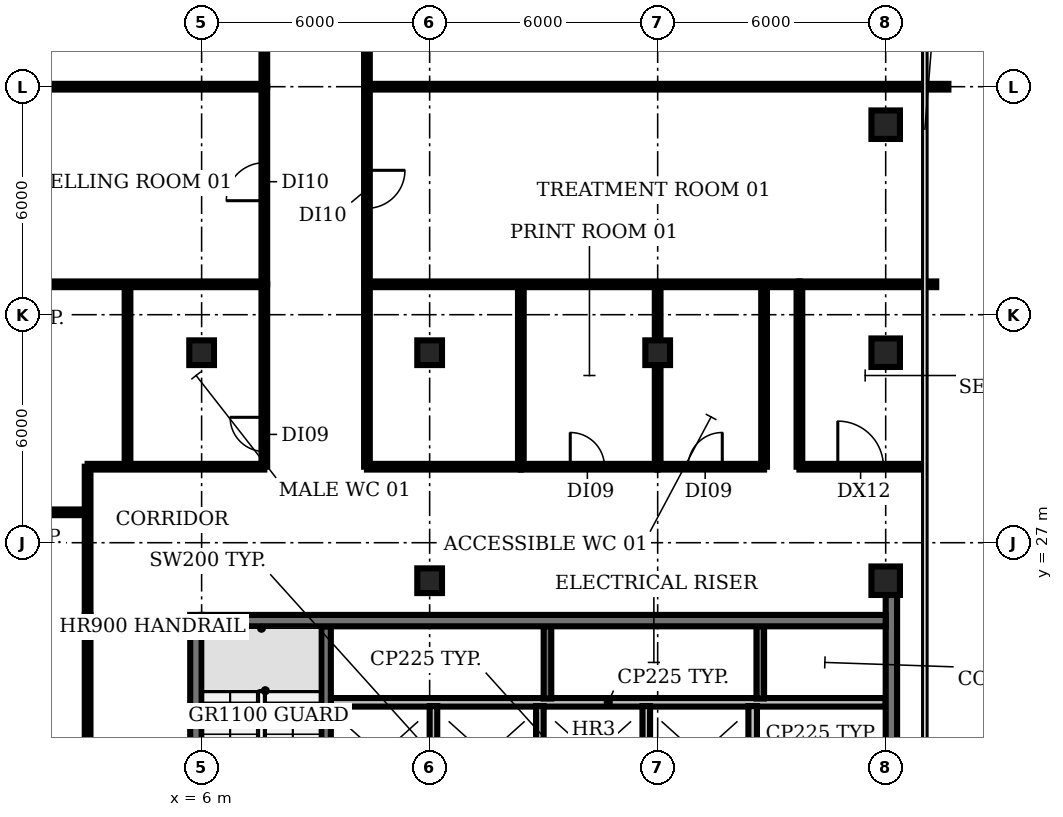
"""IFC4 building model, lengths in metres.
Left out: names, types, materials, properties, quantities, classifications, styles, units other than length and angle.
Written with IfcOpenShell. Run it as: python <this file> out.ifc"""

import sys

from ifc_helpers import new_model, si_unit, direction, frame, frame_2d, origin, origin_2d, place, context, subcontext, project, spatial, rectangle, extrude, element, fill, save


model = new_model("IFC4")
c1 = context("Model", 3, precision=1e-05, world=origin(), true_north=direction((0.0, 1.0)))
c2 = subcontext(c1, "Body", "Model", "MODEL_VIEW")
j1 = project(units=[si_unit("LENGTHUNIT", "METRE"), si_unit("PLANEANGLEUNIT", "RADIAN")], contexts=[c1])
p1 = place(None, origin())
s1 = spatial("IfcSite", under=j1, at=p1, CompositionType="ELEMENT")
p2 = place(p1, origin())
s2 = spatial("IfcBuilding", under=s1, at=p2, CompositionType="ELEMENT")
p3 = place(p2, frame((0.0, 0.0, 272.6)))
s3 = spatial("IfcBuildingStorey", under=s2, at=p3, CompositionType="ELEMENT", Elevation=272.6)
for number, where, z_axis, x_axis in (
    (1, (6.0, 32.0, 0.0), (0.0, 0.0, 1.0), (1.0, 0.0, 0.0)),
    (2, (12.0, 26.0, 0.0), (0.0, 0.0, 1.0), (1.0, 0.0, 0.0)),
    (3, (12.0, 32.0, 0.0), (0.0, 0.0, 1.0), (1.0, 0.0, 0.0)),
    (4, (18.0, 32.0, 0.0), (0.0, 0.0, 1.0), (1.0, 0.0, 0.0)),
):
    element("IfcColumn", number, at=place(p3, frame(where, z_axis=z_axis, x_axis=x_axis)), inside=s3, PredefinedType="COLUMN", context=c2, shape_type="SweptSolid", body=[
        extrude(rectangle(XDim=0.65, YDim=0.65, at=origin_2d()), origin(), (0.0, 0.0, 1.0), 3.85),
    ])
for number, where, z_axis, x_axis in (
    (5, (24.0, 26.0, 0.0), (0.0, 0.0, 1.0), (1.0, 0.0, 0.0)),
    (6, (24.0, 32.0, 0.0), (0.0, 0.0, 1.0), (1.0, 0.0, 0.0)),
    (7, (24.0, 38.0, 0.0), (0.0, 0.0, 1.0), (1.0, 0.0, 0.0)),
):
    element("IfcColumn", number, at=place(p3, frame(where, z_axis=z_axis, x_axis=x_axis)), inside=s3, PredefinedType="COLUMN", context=c2, shape_type="SweptSolid", body=[
        extrude(rectangle(XDim=0.75, YDim=0.75, at=origin_2d()), origin(), (0.0, 0.0, 1.0), 3.85),
    ])
p4 = place(p3, frame((9.4, 22.8, 0.0), z_axis=(0.0, 0.0, 1.0), x_axis=(1.0, 0.0, 0.0)))
e8 = element("IfcWall", 8, at=p4, inside=s3, PredefinedType="PARTITIONING", context=c2, shape_type="SweptSolid", body=[
    extrude(rectangle(XDim=14.6, YDim=0.225, at=frame_2d((7.3, 0.0))), origin(), (0.0, 0.0, 1.0), 3.85),
])
p5 = place(p3, frame((9.275, 18.375, 0.0), z_axis=(0.0, 0.0, 1.0), x_axis=(0.0, 1.0, 0.0)))
e9 = element("IfcWall", 9, at=p5, inside=s3, PredefinedType="SHEAR", context=c2, shape_type="SweptSolid", body=[
    extrude(rectangle(XDim=6.425, YDim=0.25, at=frame_2d((3.212, 0.0))), origin(), (0.0, 0.0, 1.0), 3.85),
])
for number, where, z_axis, x_axis in (
    (10, (12.1, 20.1, 0.0), (0.0, 0.0, 1.0), (0.0, 1.0, 0.0)),
    (11, (14.9, 20.1, 0.0), (0.0, 0.0, 1.0), (0.0, 1.0, 0.0)),
):
    element("IfcWall", number, at=place(p3, frame(where, z_axis=z_axis, x_axis=x_axis)), inside=s3, PredefinedType="SOLIDWALL", context=c2, shape_type="SweptSolid", body=[
        extrude(rectangle(XDim=2.6, YDim=0.2, at=frame_2d((1.3, 0.0))), origin(), (0.0, 0.0, 1.0), 3.85),
    ])
p6 = place(p3, frame((15.1, 22.9, 0.0), z_axis=(0.0, 0.0, 1.0), x_axis=(0.0, 1.0, 0.0)))
e12 = element("IfcWall", 12, at=p6, inside=s3, PredefinedType="SHEAR", context=c2, shape_type="SweptSolid", body=[
    extrude(rectangle(XDim=1.9, YDim=0.2, at=frame_2d((0.95, 0.0))), origin(), (0.0, 0.0, 1.0), 3.85),
])
p7 = place(p3, frame((17.7, 20.1, 0.0), z_axis=(0.0, 0.0, 1.0), x_axis=(0.0, 1.0, 0.0)))
e13 = element("IfcWall", 13, at=p7, inside=s3, PredefinedType="SOLIDWALL", context=c2, shape_type="SweptSolid", body=[
    extrude(rectangle(XDim=2.6, YDim=0.2, at=frame_2d((1.3, 0.0))), origin(), (0.0, 0.0, 1.0), 3.85),
])
p8 = place(p3, frame((20.5, 20.1, 0.0), z_axis=(0.0, 0.0, 1.0), x_axis=(0.0, 1.0, 0.0)))
e14 = element("IfcWall", 14, at=p8, inside=s3, PredefinedType="PARTITIONING", context=c2, shape_type="SweptSolid", body=[
    extrude(rectangle(XDim=2.6, YDim=0.225, at=frame_2d((1.3, 0.0))), origin(), (0.0, 0.0, 1.0), 3.85),
])
p9 = place(p3, frame((20.7, 22.9, 0.0), z_axis=(0.0, 0.0, 1.0), x_axis=(0.0, 1.0, 0.0)))
e15 = element("IfcWall", 15, at=p9, inside=s3, PredefinedType="SHEAR", context=c2, shape_type="SweptSolid", body=[
    extrude(rectangle(XDim=1.9, YDim=0.2, at=frame_2d((0.95, 0.0))), origin(), (0.0, 0.0, 1.0), 3.85),
])
p10 = place(p3, frame((5.85, 5.1, 0.0), z_axis=(0.0, 0.0, 1.0), x_axis=(0.0, 1.0, 0.0)))
e16 = element("IfcWall", 16, at=p10, inside=s3, PredefinedType="SHEAR", context=c2, shape_type="SweptSolid", body=[
    extrude(rectangle(XDim=20.0, YDim=0.3, at=frame_2d((10.0, 0.0))), origin(), (0.0, 0.0, 1.0), 3.85),
])
p11 = place(p10, frame((0.55, 0.0, 0.0)))
e17 = element("IfcOpeningElement", 17, at=p11, cuts=e16, PredefinedType="OPENING", context=c2, shape_type="SweptSolid", body=[
    extrude(rectangle(XDim=1.5, YDim=2.1, at=frame_2d((0.75, 1.05))), frame((0.0, 0.16, 0.0), z_axis=(0.0, -1.0, 0.0), x_axis=(1.0, 0.0, 0.0)), (0.0, 0.0, 1.0), 0.32),
])
p12 = place(p10, frame((7.0, 0.0, 0.0)))
e18 = element("IfcOpeningElement", 18, at=p12, cuts=e16, PredefinedType="OPENING", context=c2, shape_type="SweptSolid", body=[
    extrude(rectangle(XDim=1.2, YDim=2.1, at=frame_2d((0.6, 1.05))), frame((0.0, 0.16, 0.0), z_axis=(0.0, -1.0, 0.0), x_axis=(1.0, 0.0, 0.0)), (0.0, 0.0, 1.0), 0.32),
])
p13 = place(p10, frame((13.55, 0.0, 0.0)))
e19 = element("IfcOpeningElement", 19, at=p13, cuts=e16, PredefinedType="OPENING", context=c2, shape_type="SweptSolid", body=[
    extrude(rectangle(XDim=1.2, YDim=2.1, at=frame_2d((0.6, 1.05))), frame((0.0, 0.16, 0.0), z_axis=(0.0, -1.0, 0.0), x_axis=(1.0, 0.0, 0.0)), (0.0, 0.0, 1.0), 0.32),
])
p14 = place(p3, frame((24.15, 25.655, 0.0), z_axis=(0.0, 0.0, 1.0), x_axis=(0.0, -1.0, 0.0)))
e20 = element("IfcWall", 20, at=p14, inside=s3, PredefinedType="SHEAR", context=c2, shape_type="SweptSolid", body=[
    extrude(rectangle(XDim=20.555, YDim=0.3, at=frame_2d((10.277, 0.0))), origin(), (0.0, 0.0, 1.0), 3.85),
])
p15 = place(p14, frame((18.505, 0.0, 0.0)))
e21 = element("IfcOpeningElement", 21, at=p15, cuts=e20, PredefinedType="OPENING", context=c2, shape_type="SweptSolid", body=[
    extrude(rectangle(XDim=1.5, YDim=2.1, at=frame_2d((0.75, 1.05))), frame((0.0, 0.16, 0.0), z_axis=(0.0, -1.0, 0.0), x_axis=(1.0, 0.0, 0.0)), (0.0, 0.0, 1.0), 0.32),
])
p16 = place(p14, frame((12.405, 0.0, 0.0)))
e22 = element("IfcOpeningElement", 22, at=p16, cuts=e20, PredefinedType="OPENING", context=c2, shape_type="SweptSolid", body=[
    extrude(rectangle(XDim=0.9, YDim=2.1, at=frame_2d((0.45, 1.05))), frame((0.0, 0.16, 0.0), z_axis=(0.0, -1.0, 0.0), x_axis=(1.0, 0.0, 0.0)), (0.0, 0.0, 1.0), 0.32),
])
p17 = place(p14, frame((6.405, 0.0, 0.0)))
e23 = element("IfcOpeningElement", 23, at=p17, cuts=e20, PredefinedType="OPENING", context=c2, shape_type="SweptSolid", body=[
    extrude(rectangle(XDim=2.0, YDim=2.1, at=frame_2d((1.0, 1.05))), frame((0.0, 0.16, 0.0), z_axis=(0.0, -1.0, 0.0), x_axis=(1.0, 0.0, 0.0)), (0.0, 0.0, 1.0), 0.32),
])
p18 = place(p3, frame((6.0, 24.95, 0.0), z_axis=(0.0, 0.0, 1.0), x_axis=(1.0, 0.0, 0.0)))
e24 = element("IfcWall", 24, at=p18, inside=s3, PredefinedType="SHEAR", context=c2, shape_type="SweptSolid", body=[
    extrude(rectangle(XDim=18.0, YDim=0.3, at=frame_2d((9.0, 0.0))), origin(), (0.0, 0.0, 1.0), 3.85),
])
p19 = place(p3, frame((-1.04, 27.8, 0.0), z_axis=(0.0, 0.0, 1.0), x_axis=(1.0, 0.0, 0.0)))
e25 = element("IfcWall", 25, at=p19, inside=s3, PredefinedType="PARTITIONING", context=c2, shape_type="SweptSolid", body=[
    extrude(rectangle(XDim=4.04, YDim=0.15, at=frame_2d((2.02, 0.0))), origin(), (0.0, 0.0, 1.0), 2.9),
])
for number, where, z_axis, x_axis in (
    (26, (-0.98, 33.8, 0.0), (0.0, 0.0, 1.0), (1.0, 0.0, 0.0)),
    (27, (-0.98, 39.0, 0.0), (0.0, 0.0, 1.0), (1.0, 0.0, 0.0)),
):
    element("IfcWall", number, at=place(p3, frame(where, z_axis=z_axis, x_axis=x_axis)), inside=s3, PredefinedType="PARTITIONING", context=c2, shape_type="SweptSolid", body=[
        extrude(rectangle(XDim=8.63, YDim=0.15, at=frame_2d((4.315, 0.0))), origin(), (0.0, 0.0, 1.0), 2.9),
    ])
p20 = place(p3, frame((3.0, 5.1, 0.0), z_axis=(0.0, 0.0, 1.0), x_axis=(0.0, 1.0, 0.0)))
e28 = element("IfcWall", 28, at=p20, inside=s3, PredefinedType="PARTITIONING", context=c2, shape_type="SweptSolid", body=[
    extrude(rectangle(XDim=20.0, YDim=0.15, at=frame_2d((10.0, 0.0))), origin(), (0.0, 0.0, 1.0), 2.9),
])
p21 = place(p20, frame((9.3, 0.0, 0.0)))
e29 = element("IfcOpeningElement", 29, at=p21, cuts=e28, PredefinedType="OPENING", context=c2, shape_type="SweptSolid", body=[
    extrude(rectangle(XDim=1.2, YDim=2.1, at=frame_2d((0.6, 1.05))), frame((0.0, 0.085, 0.0), z_axis=(0.0, -1.0, 0.0), x_axis=(1.0, 0.0, 0.0)), (0.0, 0.0, 1.0), 0.17),
])
p22 = place(p3, frame((3.0, 25.1, 0.0), z_axis=(0.0, 0.0, 1.0), x_axis=(0.0, 1.0, 0.0)))
e30 = element("IfcWall", 30, at=p22, inside=s3, PredefinedType="PARTITIONING", context=c2, shape_type="SweptSolid", body=[
    extrude(rectangle(XDim=3.9, YDim=0.15, at=frame_2d((1.95, 0.0))), origin(), (0.0, 0.0, 1.0), 2.9),
])
p23 = place(p3, frame((3.0, 29.0, 0.0), z_axis=(0.0, 0.0, 1.0), x_axis=(1.0, 0.0, 0.0)))
e31 = element("IfcWall", 31, at=p23, inside=s3, PredefinedType="PARTITIONING", context=c2, shape_type="SweptSolid", body=[
    extrude(rectangle(XDim=4.65, YDim=0.15, at=frame_2d((2.325, 0.0))), origin(), (0.0, 0.0, 1.0), 2.9),
])
p24 = place(p3, frame((4.05, 29.0, 0.0), z_axis=(0.0, 0.0, 1.0), x_axis=(0.0, 1.0, 0.0)))
e32 = element("IfcWall", 32, at=p24, inside=s3, PredefinedType="PARTITIONING", context=c2, shape_type="SweptSolid", body=[
    extrude(rectangle(XDim=4.8, YDim=0.15, at=frame_2d((2.4, 0.0))), origin(), (0.0, 0.0, 1.0), 2.9),
])
p25 = place(p3, frame((7.65, 29.0, 0.0), z_axis=(0.0, 0.0, 1.0), x_axis=(0.0, 1.0, 0.0)))
e33 = element("IfcWall", 33, at=p25, inside=s3, PredefinedType="PARTITIONING", context=c2, shape_type="SweptSolid", body=[
    extrude(rectangle(XDim=4.8, YDim=0.15, at=frame_2d((2.4, 0.0))), origin(), (0.0, 0.0, 1.0), 2.9),
])
p26 = place(p25, frame((0.4, 0.0, 0.0)))
e34 = element("IfcOpeningElement", 34, at=p26, cuts=e33, PredefinedType="OPENING", context=c2, shape_type="SweptSolid", body=[
    extrude(rectangle(XDim=0.9, YDim=2.1, at=frame_2d((0.45, 1.05))), frame((0.0, 0.085, 0.0), z_axis=(0.0, -1.0, 0.0), x_axis=(1.0, 0.0, 0.0)), (0.0, 0.0, 1.0), 0.17),
])
p27 = place(p3, frame((7.65, 33.8, 0.0), z_axis=(0.0, 0.0, 1.0), x_axis=(0.0, 1.0, 0.0)))
e35 = element("IfcWall", 35, at=p27, inside=s3, PredefinedType="PARTITIONING", context=c2, shape_type="SweptSolid", body=[
    extrude(rectangle(XDim=5.2, YDim=0.15, at=frame_2d((2.6, 0.0))), origin(), (0.0, 0.0, 1.0), 2.9),
])
p28 = place(p27, frame((2.2, 0.0, 0.0)))
e36 = element("IfcOpeningElement", 36, at=p28, cuts=e35, PredefinedType="OPENING", context=c2, shape_type="SweptSolid", body=[
    extrude(rectangle(XDim=1.0, YDim=2.1, at=frame_2d((0.5, 1.05))), frame((0.0, 0.085, 0.0), z_axis=(0.0, -1.0, 0.0), x_axis=(1.0, 0.0, 0.0)), (0.0, 0.0, 1.0), 0.17),
])
p29 = place(p3, frame((7.65, 39.0, 0.0), z_axis=(0.0, 0.0, 1.0), x_axis=(0.0, 1.0, 0.0)))
e37 = element("IfcWall", 37, at=p29, inside=s3, PredefinedType="PARTITIONING", context=c2, shape_type="SweptSolid", body=[
    extrude(rectangle(XDim=6.0, YDim=0.15, at=frame_2d((3.0, 0.0))), origin(), (0.0, 0.0, 1.0), 2.9),
])
p30 = place(p29, frame((1.8, 0.0, 0.0)))
e38 = element("IfcOpeningElement", 38, at=p30, cuts=e37, PredefinedType="OPENING", context=c2, shape_type="SweptSolid", body=[
    extrude(rectangle(XDim=1.0, YDim=2.1, at=frame_2d((0.5, 1.05))), frame((0.0, 0.085, 0.0), z_axis=(0.0, -1.0, 0.0), x_axis=(1.0, 0.0, 0.0)), (0.0, 0.0, 1.0), 0.17),
])
p31 = place(p3, frame((10.35, 29.0, 0.0), z_axis=(0.0, 0.0, 1.0), x_axis=(0.0, 1.0, 0.0)))
e39 = element("IfcWall", 39, at=p31, inside=s3, PredefinedType="PARTITIONING", context=c2, shape_type="SweptSolid", body=[
    extrude(rectangle(XDim=4.8, YDim=0.15, at=frame_2d((2.4, 0.0))), origin(), (0.0, 0.0, 1.0), 2.9),
])
p32 = place(p3, frame((10.35, 29.0, 0.0), z_axis=(0.0, 0.0, 1.0), x_axis=(1.0, 0.0, 0.0)))
e40 = element("IfcWall", 40, at=p32, inside=s3, PredefinedType="PARTITIONING", context=c2, shape_type="SweptSolid", body=[
    extrude(rectangle(XDim=4.05, YDim=0.15, at=frame_2d((2.025, 0.0))), origin(), (0.0, 0.0, 1.0), 2.9),
])
p33 = place(p3, frame((10.35, 33.8, 0.0), z_axis=(0.0, 0.0, 1.0), x_axis=(1.0, 0.0, 0.0)))
e41 = element("IfcWall", 41, at=p33, inside=s3, PredefinedType="PARTITIONING", context=c2, shape_type="SweptSolid", body=[
    extrude(rectangle(XDim=11.38, YDim=0.15, at=frame_2d((5.69, 0.0))), origin(), (0.0, 0.0, 1.0), 2.9),
])
p34 = place(p3, frame((10.35, 39.0, 0.0), z_axis=(0.0, 0.0, 1.0), x_axis=(0.0, -1.0, 0.0)))
e42 = element("IfcWall", 42, at=p34, inside=s3, PredefinedType="PARTITIONING", context=c2, shape_type="SweptSolid", body=[
    extrude(rectangle(XDim=5.2, YDim=0.15, at=frame_2d((2.6, 0.0))), origin(), (0.0, 0.0, 1.0), 2.9),
])
p35 = place(p34, frame((2.2, 0.0, 0.0)))
e43 = element("IfcOpeningElement", 43, at=p35, cuts=e42, PredefinedType="OPENING", context=c2, shape_type="SweptSolid", body=[
    extrude(rectangle(XDim=1.0, YDim=2.1, at=frame_2d((0.5, 1.05))), frame((0.0, 0.085, 0.0), z_axis=(0.0, -1.0, 0.0), x_axis=(1.0, 0.0, 0.0)), (0.0, 0.0, 1.0), 0.17),
])
p36 = place(p3, frame((10.35, 39.0, 0.0), z_axis=(0.0, 0.0, 1.0), x_axis=(0.0, 1.0, 0.0)))
e44 = element("IfcWall", 44, at=p36, inside=s3, PredefinedType="PARTITIONING", context=c2, shape_type="SweptSolid", body=[
    extrude(rectangle(XDim=6.0, YDim=0.15, at=frame_2d((3.0, 0.0))), origin(), (0.0, 0.0, 1.0), 2.9),
])
p37 = place(p36, frame((2.3, 0.0, 0.0)))
e45 = element("IfcOpeningElement", 45, at=p37, cuts=e44, PredefinedType="OPENING", context=c2, shape_type="SweptSolid", body=[
    extrude(rectangle(XDim=1.2, YDim=2.1, at=frame_2d((0.6, 1.05))), frame((0.0, 0.085, 0.0), z_axis=(0.0, -1.0, 0.0), x_axis=(1.0, 0.0, 0.0)), (0.0, 0.0, 1.0), 0.17),
])
p38 = place(p3, frame((10.35, 39.0, 0.0), z_axis=(0.0, 0.0, 1.0), x_axis=(1.0, 0.0, 0.0)))
e46 = element("IfcWall", 46, at=p38, inside=s3, PredefinedType="PARTITIONING", context=c2, shape_type="SweptSolid", body=[
    extrude(rectangle(XDim=15.3, YDim=0.15, at=frame_2d((7.65, 0.0))), origin(), (0.0, 0.0, 1.0), 2.9),
])
p39 = place(p3, frame((14.4, 29.0, 0.0), z_axis=(0.0, 0.0, 1.0), x_axis=(0.0, 1.0, 0.0)))
e47 = element("IfcWall", 47, at=p39, inside=s3, PredefinedType="PARTITIONING", context=c2, shape_type="SweptSolid", body=[
    extrude(rectangle(XDim=4.8, YDim=0.15, at=frame_2d((2.4, 0.0))), origin(), (0.0, 0.0, 1.0), 2.9),
])
p40 = place(p3, frame((14.4, 29.0, 0.0), z_axis=(0.0, 0.0, 1.0), x_axis=(1.0, 0.0, 0.0)))
e48 = element("IfcWall", 48, at=p40, inside=s3, PredefinedType="PARTITIONING", context=c2, shape_type="SweptSolid", body=[
    extrude(rectangle(XDim=3.6, YDim=0.15, at=frame_2d((1.8, 0.0))), origin(), (0.0, 0.0, 1.0), 2.9),
])
p41 = place(p40, frame((1.3, 0.0, 0.0)))
e49 = element("IfcOpeningElement", 49, at=p41, cuts=e48, PredefinedType="OPENING", context=c2, shape_type="SweptSolid", body=[
    extrude(rectangle(XDim=0.9, YDim=2.1, at=frame_2d((0.45, 1.05))), frame((0.0, 0.085, 0.0), z_axis=(0.0, -1.0, 0.0), x_axis=(1.0, 0.0, 0.0)), (0.0, 0.0, 1.0), 0.17),
])
p42 = place(p3, frame((18.0, 29.0, 0.0), z_axis=(0.0, 0.0, 1.0), x_axis=(0.0, 1.0, 0.0)))
e50 = element("IfcWall", 50, at=p42, inside=s3, PredefinedType="PARTITIONING", context=c2, shape_type="SweptSolid", body=[
    extrude(rectangle(XDim=4.8, YDim=0.15, at=frame_2d((2.4, 0.0))), origin(), (0.0, 0.0, 1.0), 2.9),
])
p43 = place(p3, frame((18.0, 29.0, 0.0), z_axis=(0.0, 0.0, 1.0), x_axis=(1.0, 0.0, 0.0)))
e51 = element("IfcWall", 51, at=p43, inside=s3, PredefinedType="PARTITIONING", context=c2, shape_type="SweptSolid", body=[
    extrude(rectangle(XDim=2.8, YDim=0.15, at=frame_2d((1.4, 0.0))), origin(), (0.0, 0.0, 1.0), 2.9),
])
p44 = place(p43, frame((0.8, 0.0, 0.0)))
e52 = element("IfcOpeningElement", 52, at=p44, cuts=e51, PredefinedType="OPENING", context=c2, shape_type="SweptSolid", body=[
    extrude(rectangle(XDim=0.9, YDim=2.1, at=frame_2d((0.45, 1.05))), frame((0.0, 0.085, 0.0), z_axis=(0.0, -1.0, 0.0), x_axis=(1.0, 0.0, 0.0)), (0.0, 0.0, 1.0), 0.17),
])
for number, where, z_axis, x_axis in (
    (53, (20.8, 29.0, 0.0), (0.0, 0.0, 1.0), (0.0, 1.0, 0.0)),
    (54, (21.73, 29.0, 0.0), (0.0, 0.0, 1.0), (0.0, 1.0, 0.0)),
):
    element("IfcWall", number, at=place(p3, frame(where, z_axis=z_axis, x_axis=x_axis)), inside=s3, PredefinedType="PARTITIONING", context=c2, shape_type="SweptSolid", body=[
        extrude(rectangle(XDim=4.8, YDim=0.15, at=frame_2d((2.4, 0.0))), origin(), (0.0, 0.0, 1.0), 2.9),
    ])
p45 = place(p3, frame((21.73, 29.0, 0.0), z_axis=(0.0, 0.0, 1.0), x_axis=(1.0, 0.0, 0.0)))
e55 = element("IfcWall", 55, at=p45, inside=s3, PredefinedType="PARTITIONING", context=c2, shape_type="SweptSolid", body=[
    extrude(rectangle(XDim=3.24, YDim=0.15, at=frame_2d((1.62, 0.0))), origin(), (0.0, 0.0, 1.0), 2.9),
])
p46 = place(p45, frame((1.01, 0.0, 0.0)))
e56 = element("IfcOpeningElement", 56, at=p46, cuts=e55, PredefinedType="OPENING", context=c2, shape_type="SweptSolid", body=[
    extrude(rectangle(XDim=1.2, YDim=2.1, at=frame_2d((0.6, 1.05))), frame((0.0, 0.085, 0.0), z_axis=(0.0, -1.0, 0.0), x_axis=(1.0, 0.0, 0.0)), (0.0, 0.0, 1.0), 0.17),
])
p47 = place(p3, frame((21.73, 33.8, 0.0), z_axis=(0.0, 0.0, 1.0), x_axis=(1.0, 0.0, 0.0)))
e57 = element("IfcWall", 57, at=p47, inside=s3, PredefinedType="PARTITIONING", context=c2, shape_type="SweptSolid", body=[
    extrude(rectangle(XDim=3.6, YDim=0.15, at=frame_2d((1.8, 0.0))), origin(), (0.0, 0.0, 1.0), 2.9),
])
p48 = place(p26, origin())
e58 = element("IfcDoor", 58, at=p48, inside=s3, OperationType="SINGLE_SWING_RIGHT", PredefinedType="DOOR", context=c2, shape_type="SweptSolid", body=[
    extrude(rectangle(XDim=0.9, YDim=2.1, at=frame_2d((0.45, 1.05))), frame((0.0, 0.025, 0.0), z_axis=(0.0, -1.0, 0.0), x_axis=(1.0, 0.0, 0.0)), (0.0, 0.0, 1.0), 0.05),
])
fill(e34, e58)
p49 = place(p28, origin())
e59 = element("IfcDoor", 59, at=p49, inside=s3, OperationType="SINGLE_SWING_LEFT", PredefinedType="DOOR", context=c2, shape_type="SweptSolid", body=[
    extrude(rectangle(XDim=1.0, YDim=2.1, at=frame_2d((0.5, 1.05))), frame((0.0, 0.025, 0.0), z_axis=(0.0, -1.0, 0.0), x_axis=(1.0, 0.0, 0.0)), (0.0, 0.0, 1.0), 0.05),
])
fill(e36, e59)
p50 = place(p35, origin())
e60 = element("IfcDoor", 60, at=p50, inside=s3, OperationType="SINGLE_SWING_LEFT", PredefinedType="DOOR", context=c2, shape_type="SweptSolid", body=[
    extrude(rectangle(XDim=1.0, YDim=2.1, at=frame_2d((0.5, 1.05))), frame((0.0, 0.025, 0.0), z_axis=(0.0, -1.0, 0.0), x_axis=(1.0, 0.0, 0.0)), (0.0, 0.0, 1.0), 0.05),
])
fill(e43, e60)
p51 = place(p41, origin())
e61 = element("IfcDoor", 61, at=p51, inside=s3, OperationType="SINGLE_SWING_LEFT", PredefinedType="DOOR", context=c2, shape_type="SweptSolid", body=[
    extrude(rectangle(XDim=0.9, YDim=2.1, at=frame_2d((0.45, 1.05))), frame((0.0, 0.025, 0.0), z_axis=(0.0, -1.0, 0.0), x_axis=(1.0, 0.0, 0.0)), (0.0, 0.0, 1.0), 0.05),
])
fill(e49, e61)
p52 = place(p44, origin())
e62 = element("IfcDoor", 62, at=p52, inside=s3, OperationType="SINGLE_SWING_RIGHT", PredefinedType="DOOR", context=c2, shape_type="SweptSolid", body=[
    extrude(rectangle(XDim=0.9, YDim=2.1, at=frame_2d((0.45, 1.05))), frame((0.0, 0.025, 0.0), z_axis=(0.0, -1.0, 0.0), x_axis=(1.0, 0.0, 0.0)), (0.0, 0.0, 1.0), 0.05),
])
fill(e52, e62)
p53 = place(p46, origin())
e63 = element("IfcDoor", 63, at=p53, inside=s3, OperationType="SINGLE_SWING_LEFT", PredefinedType="DOOR", context=c2, shape_type="SweptSolid", body=[
    extrude(rectangle(XDim=1.2, YDim=2.1, at=frame_2d((0.6, 1.05))), frame((0.0, 0.025, 0.0), z_axis=(0.0, -1.0, 0.0), x_axis=(1.0, 0.0, 0.0)), (0.0, 0.0, 1.0), 0.05),
])
fill(e56, e63)
save(model, sys.argv[1])
